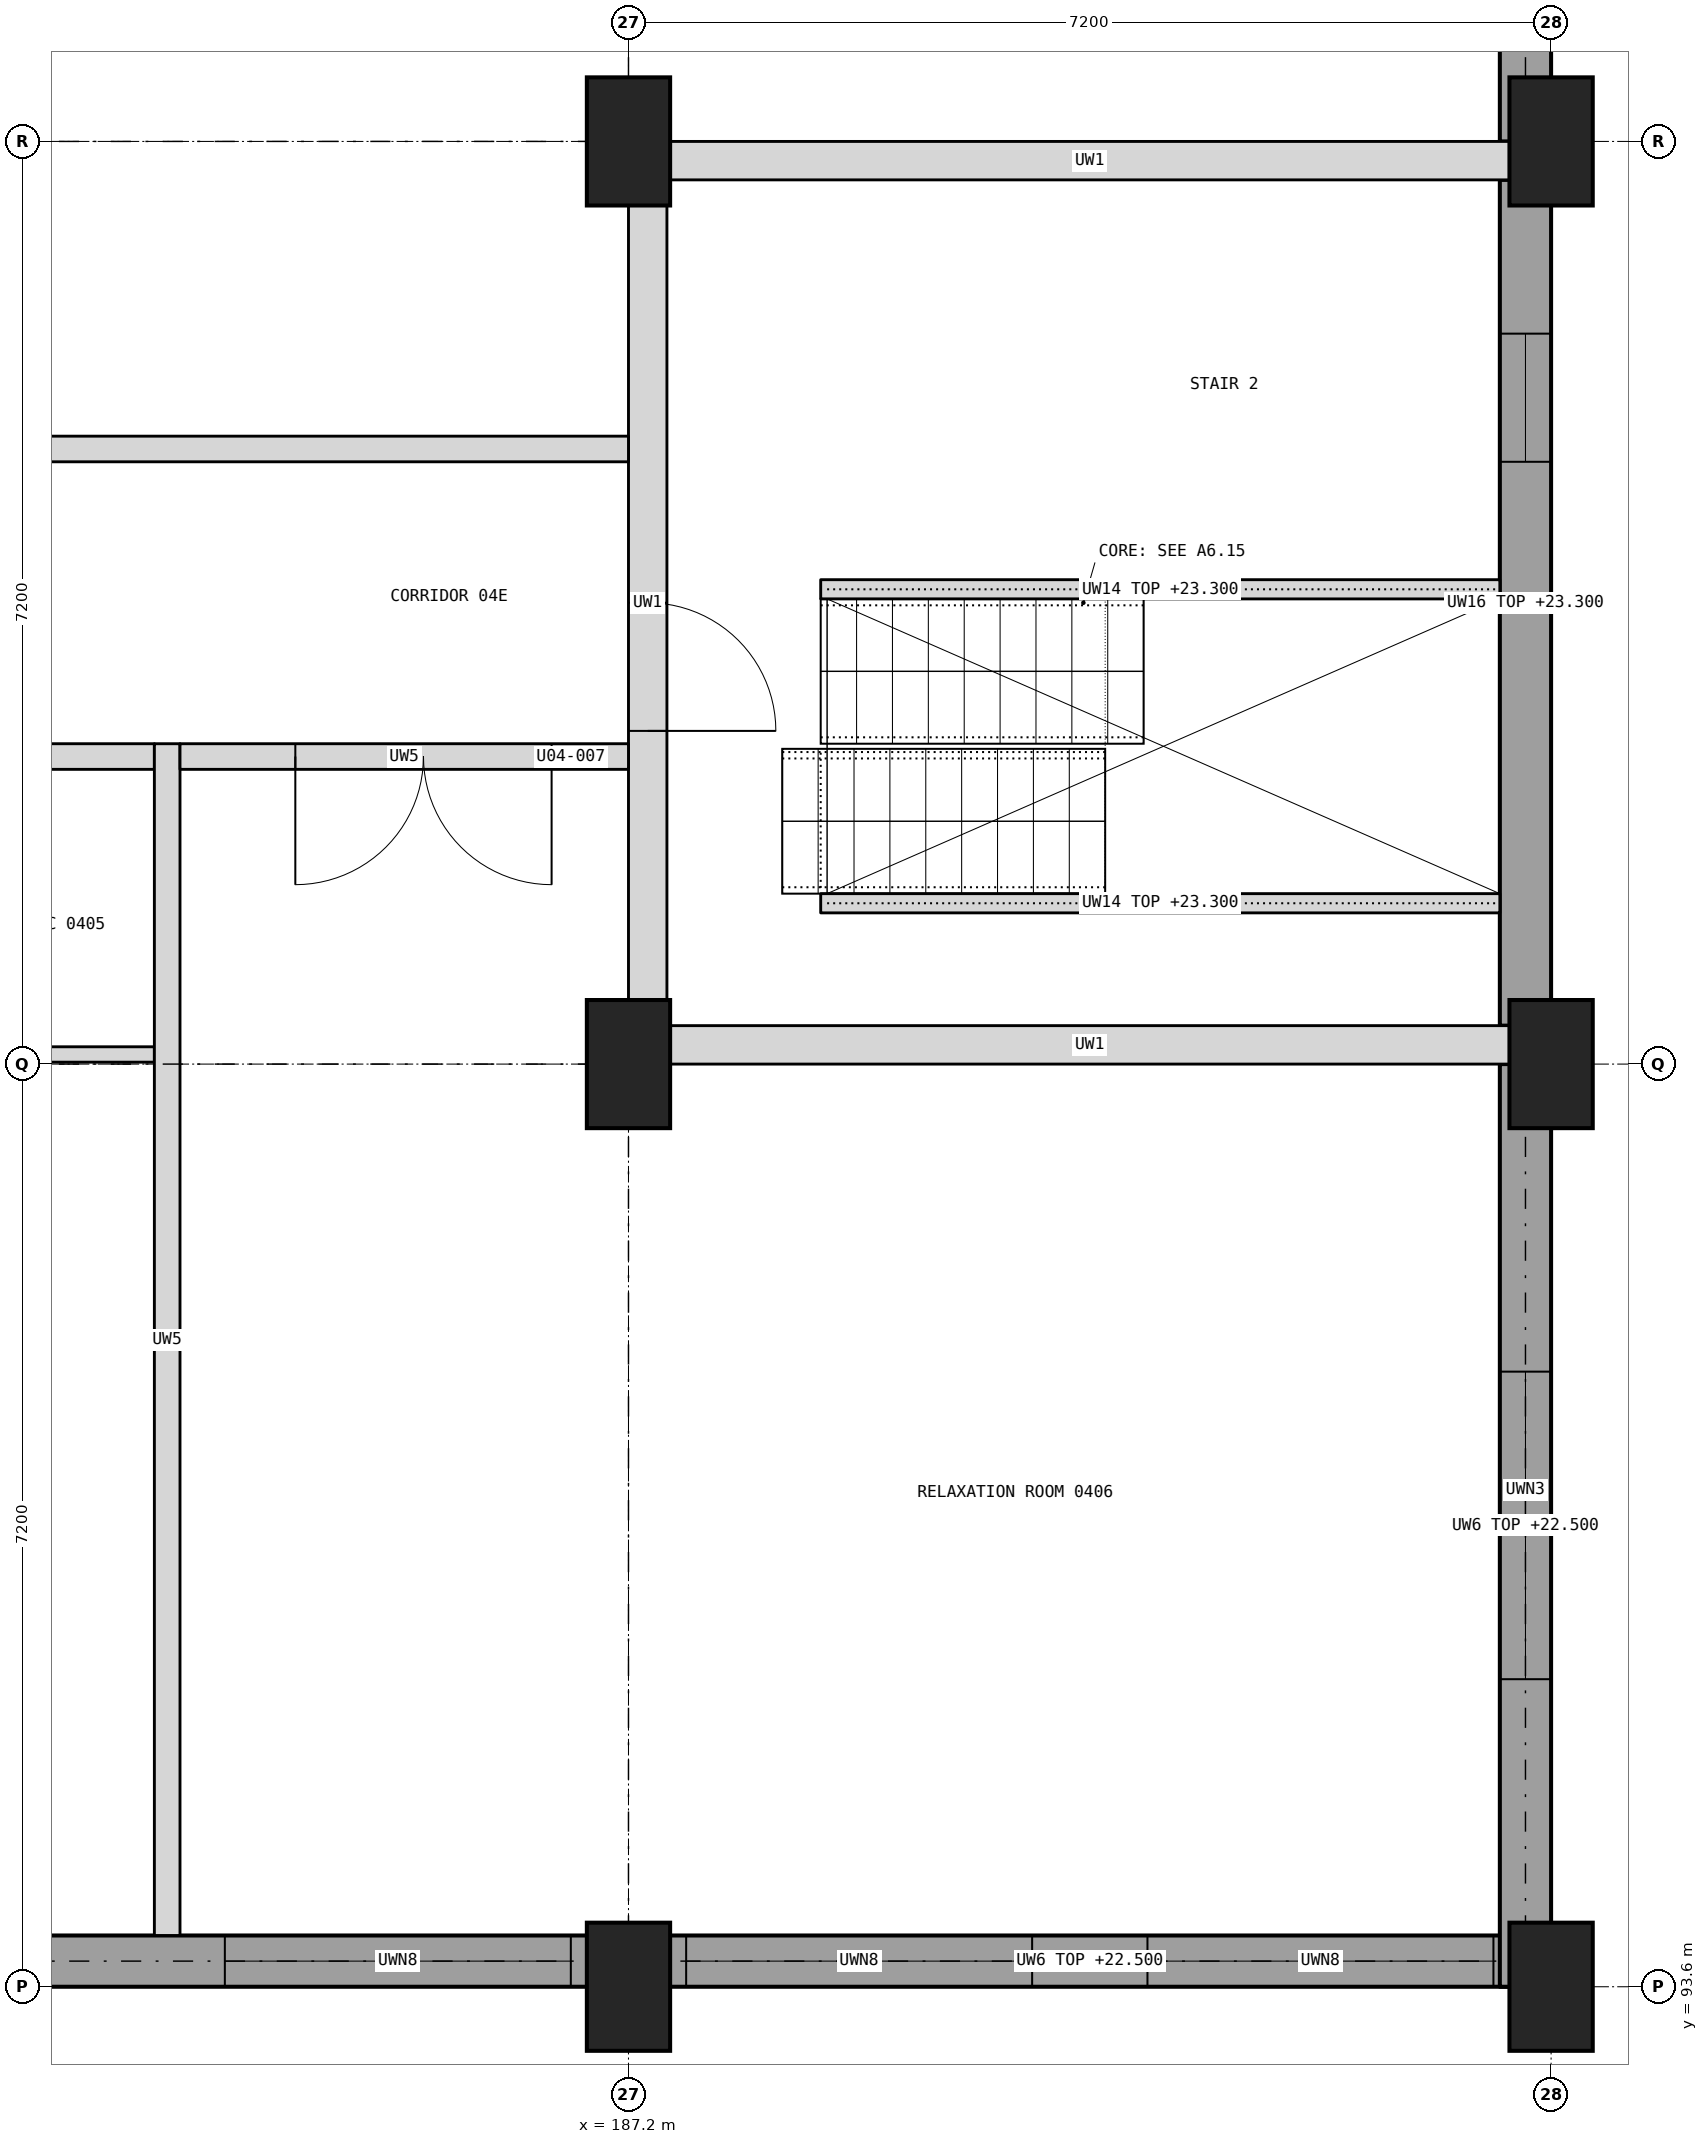
"""IFC4 building model, lengths in metres.
Left out: names, types, materials, properties, quantities, classifications, styles, units other than length and angle.
Written with IfcOpenShell. Run it as: python <this file> out.ifc"""

import sys

from ifc_helpers import new_model, si_unit, direction, frame, frame_2d, origin, origin_2d, place, context, subcontext, project, spatial, rectangle, extrude, element, fill, save


model = new_model("IFC4")
c1 = context("Model", 3, precision=1e-05, world=origin(), true_north=direction((0.0, 1.0)))
c2 = subcontext(c1, "Body", "Model", "MODEL_VIEW")
j1 = project(units=[si_unit("LENGTHUNIT", "METRE"), si_unit("PLANEANGLEUNIT", "RADIAN")], contexts=[c1])
p1 = place(None, origin())
s1 = spatial("IfcSite", under=j1, at=p1, CompositionType="ELEMENT")
p2 = place(p1, origin())
s2 = spatial("IfcBuilding", under=s1, at=p2, CompositionType="ELEMENT")
p3 = place(p2, frame((0.0, 0.0, 19.9)))
s3 = spatial("IfcBuildingStorey", under=s2, at=p3, CompositionType="ELEMENT", Elevation=19.9)
for number, where, z_axis, x_axis in (
    (1, (187.2, 93.6, 0.0), (0.0, 0.0, 1.0), (1.0, 0.0, 0.0)),
    (2, (187.2, 100.8, 0.0), (0.0, 0.0, 1.0), (1.0, 0.0, 0.0)),
    (3, (187.2, 108.0, 0.0), (0.0, 0.0, 1.0), (1.0, 0.0, 0.0)),
    (4, (194.4, 93.6, 0.0), (0.0, 0.0, 1.0), (1.0, 0.0, 0.0)),
    (5, (194.4, 100.8, 0.0), (0.0, 0.0, 1.0), (1.0, 0.0, 0.0)),
    (6, (194.4, 108.0, 0.0), (0.0, 0.0, 1.0), (1.0, 0.0, 0.0)),
):
    element("IfcColumn", number, at=place(p3, frame(where, z_axis=z_axis, x_axis=x_axis)), inside=s3, PredefinedType="COLUMN", context=c2, shape_type="SweptSolid", body=[
        extrude(rectangle(XDim=0.65, YDim=1.0, at=origin_2d()), origin(), (0.0, 0.0, 1.0), 3.4),
    ])
for number, where, z_axis, x_axis in (
    (7, (194.4, 100.95, 0.0), (0.0, 0.0, 1.0), (-1.0, 0.0, 0.0)),
    (8, (194.4, 107.85, 0.0), (0.0, 0.0, 1.0), (-1.0, 0.0, 0.0)),
):
    element("IfcWall", number, at=place(p3, frame(where, z_axis=z_axis, x_axis=x_axis)), inside=s3, PredefinedType="SHEAR", context=c2, shape_type="SweptSolid", body=[
        extrude(rectangle(XDim=7.2, YDim=0.3, at=frame_2d((3.6, 0.0))), origin(), (0.0, 0.0, 1.0), 3.4),
    ])
p4 = place(p3, frame((187.35, 101.1, 0.0), z_axis=(0.0, 0.0, 1.0), x_axis=(0.0, 1.0, 0.0)))
e9 = element("IfcWall", 9, at=p4, inside=s3, PredefinedType="SHEAR", context=c2, shape_type="SweptSolid", body=[
    extrude(rectangle(XDim=6.6, YDim=0.3, at=frame_2d((3.3, 0.0))), origin(), (0.0, 0.0, 1.0), 3.4),
])
p5 = place(p4, frame((2.3, 0.0, 0.0)))
e10 = element("IfcOpeningElement", 10, at=p5, cuts=e9, PredefinedType="OPENING", context=c2, shape_type="SweptSolid", body=[
    extrude(rectangle(XDim=1.0, YDim=2.1, at=frame_2d((0.5, 1.05))), frame((0.0, 0.16, 0.0), z_axis=(0.0, -1.0, 0.0), x_axis=(1.0, 0.0, 0.0)), (0.0, 0.0, 1.0), 0.32),
])
p6 = place(p3, frame((194.2, 101.1, 0.0), z_axis=(0.0, 0.0, 1.0), x_axis=(0.0, 1.0, 0.0)))
e11 = element("IfcWall", 11, at=p6, inside=s3, PredefinedType="SHEAR", context=c2, shape_type="SweptSolid", body=[
    extrude(rectangle(XDim=6.6, YDim=0.4, at=frame_2d((3.3, 0.0))), origin(), (0.0, 0.0, 1.0), 3.4),
])
p7 = place(p6, frame((4.4, 0.0, 1.0)))
e12 = element("IfcOpeningElement", 12, at=p7, cuts=e11, PredefinedType="OPENING", context=c2, shape_type="SweptSolid", body=[
    extrude(rectangle(XDim=1.0, YDim=1.5, at=frame_2d((0.5, 0.75))), frame((0.0, 0.21, 0.0), z_axis=(0.0, -1.0, 0.0), x_axis=(1.0, 0.0, 0.0)), (0.0, 0.0, 1.0), 0.42),
])
for number, where, z_axis, x_axis in (
    (13, (188.7, 102.055, 0.0), (0.0, 0.0, 1.0), (1.0, 0.0, 0.0)),
    (14, (188.7, 104.505, 0.0), (0.0, 0.0, 1.0), (1.0, 0.0, 0.0)),
):
    element("IfcWall", number, at=place(p3, frame(where, z_axis=z_axis, x_axis=x_axis)), inside=s3, PredefinedType="SHEAR", context=c2, shape_type="SweptSolid", body=[
        extrude(rectangle(XDim=5.3, YDim=0.15, at=frame_2d((2.65, 0.0))), origin(), (0.0, 0.0, 1.0), 3.4),
    ])
p8 = place(p3, frame((180.0, 93.8, 0.0), z_axis=(0.0, 0.0, 1.0), x_axis=(1.0, 0.0, 0.0)))
e15 = element("IfcWall", 15, at=p8, inside=s3, PredefinedType="SOLIDWALL", context=c2, shape_type="SweptSolid", body=[
    extrude(rectangle(XDim=7.2, YDim=0.4, at=frame_2d((3.6, 0.0))), origin(), (0.0, 0.0, 1.0), 2.6),
])
p9 = place(p8, frame((1.4, 0.0, 0.9)))
e16 = element("IfcOpeningElement", 16, at=p9, cuts=e15, PredefinedType="OPENING", context=c2, shape_type="SweptSolid", body=[
    extrude(rectangle(XDim=0.8, YDim=1.5, at=frame_2d((0.4, 0.75))), frame((0.0, 0.21, 0.0), z_axis=(0.0, -1.0, 0.0), x_axis=(1.0, 0.0, 0.0)), (0.0, 0.0, 1.0), 0.42),
])
p10 = place(p8, frame((4.05, 0.0, 0.9)))
e17 = element("IfcOpeningElement", 17, at=p10, cuts=e15, PredefinedType="OPENING", context=c2, shape_type="SweptSolid", body=[
    extrude(rectangle(XDim=2.7, YDim=1.5, at=frame_2d((1.35, 0.75))), frame((0.0, 0.21, 0.0), z_axis=(0.0, -1.0, 0.0), x_axis=(1.0, 0.0, 0.0)), (0.0, 0.0, 1.0), 0.42),
])
p11 = place(p3, frame((187.2, 93.8, 0.0), z_axis=(0.0, 0.0, 1.0), x_axis=(1.0, 0.0, 0.0)))
e18 = element("IfcWall", 18, at=p11, inside=s3, PredefinedType="SOLIDWALL", context=c2, shape_type="SweptSolid", body=[
    extrude(rectangle(XDim=7.2, YDim=0.4, at=frame_2d((3.6, 0.0))), origin(), (0.0, 0.0, 1.0), 2.6),
])
p12 = place(p11, frame((0.45, 0.0, 0.9)))
e19 = element("IfcOpeningElement", 19, at=p12, cuts=e18, PredefinedType="OPENING", context=c2, shape_type="SweptSolid", body=[
    extrude(rectangle(XDim=2.7, YDim=1.5, at=frame_2d((1.35, 0.75))), frame((0.0, 0.21, 0.0), z_axis=(0.0, -1.0, 0.0), x_axis=(1.0, 0.0, 0.0)), (0.0, 0.0, 1.0), 0.42),
])
p13 = place(p11, frame((4.05, 0.0, 0.9)))
e20 = element("IfcOpeningElement", 20, at=p13, cuts=e18, PredefinedType="OPENING", context=c2, shape_type="SweptSolid", body=[
    extrude(rectangle(XDim=2.7, YDim=1.5, at=frame_2d((1.35, 0.75))), frame((0.0, 0.21, 0.0), z_axis=(0.0, -1.0, 0.0), x_axis=(1.0, 0.0, 0.0)), (0.0, 0.0, 1.0), 0.42),
])
p14 = place(p3, frame((194.2, 93.6, 0.0), z_axis=(0.0, 0.0, 1.0), x_axis=(0.0, 1.0, 0.0)))
e21 = element("IfcWall", 21, at=p14, inside=s3, PredefinedType="SOLIDWALL", context=c2, shape_type="SweptSolid", body=[
    extrude(rectangle(XDim=7.2, YDim=0.4, at=frame_2d((3.6, 0.0))), origin(), (0.0, 0.0, 1.0), 2.6),
])
p15 = place(p14, frame((2.4, 0.0, 0.9)))
e22 = element("IfcOpeningElement", 22, at=p15, cuts=e21, PredefinedType="OPENING", context=c2, shape_type="SweptSolid", body=[
    extrude(rectangle(XDim=2.4, YDim=1.5, at=frame_2d((1.2, 0.75))), frame((0.0, 0.21, 0.0), z_axis=(0.0, -1.0, 0.0), x_axis=(1.0, 0.0, 0.0)), (0.0, 0.0, 1.0), 0.42),
])
p16 = place(p3, frame((194.2, 108.0, 0.0), z_axis=(0.0, 0.0, 1.0), x_axis=(0.0, 1.0, 0.0)))
e23 = element("IfcWall", 23, at=p16, inside=s3, PredefinedType="SOLIDWALL", context=c2, shape_type="SweptSolid", body=[
    extrude(rectangle(XDim=7.2, YDim=0.4, at=frame_2d((3.6, 0.0))), origin(), (0.0, 0.0, 1.0), 2.6),
])
p17 = place(p16, frame((2.4, 0.0, 0.9)))
e24 = element("IfcOpeningElement", 24, at=p17, cuts=e23, PredefinedType="OPENING", context=c2, shape_type="SweptSolid", body=[
    extrude(rectangle(XDim=2.4, YDim=1.5, at=frame_2d((1.2, 0.75))), frame((0.0, 0.21, 0.0), z_axis=(0.0, -1.0, 0.0), x_axis=(1.0, 0.0, 0.0)), (0.0, 0.0, 1.0), 0.42),
])
p18 = place(p3, frame((180.275, 100.875, 0.0), z_axis=(0.0, 0.0, 1.0), x_axis=(1.0, 0.0, 0.0)))
e25 = element("IfcWall", 25, at=p18, inside=s3, PredefinedType="PARTITIONING", context=c2, shape_type="SweptSolid", body=[
    extrude(rectangle(XDim=3.225, YDim=0.12, at=frame_2d((1.613, 0.0))), origin(), (0.0, 0.0, 1.0), 2.55),
])
p19 = place(p18, frame((1.15, 0.0, 0.0)))
e26 = element("IfcOpeningElement", 26, at=p19, cuts=e25, PredefinedType="OPENING", context=c2, shape_type="SweptSolid", body=[
    extrude(rectangle(XDim=0.75, YDim=2.1, at=frame_2d((0.375, 1.05))), frame((0.0, 0.07, 0.0), z_axis=(0.0, -1.0, 0.0), x_axis=(1.0, 0.0, 0.0)), (0.0, 0.0, 1.0), 0.14),
])
p20 = place(p3, frame((180.1, 103.2, 0.0), z_axis=(0.0, 0.0, 1.0), x_axis=(1.0, 0.0, 0.0)))
e27 = element("IfcWall", 27, at=p20, inside=s3, PredefinedType="PARTITIONING", context=c2, shape_type="SweptSolid", body=[
    extrude(rectangle(XDim=3.4, YDim=0.2, at=frame_2d((1.7, 0.0))), origin(), (0.0, 0.0, 1.0), 3.1),
])
p21 = place(p20, frame((1.25, 0.0, 0.0)))
e28 = element("IfcOpeningElement", 28, at=p21, cuts=e27, PredefinedType="OPENING", context=c2, shape_type="SweptSolid", body=[
    extrude(rectangle(XDim=0.9, YDim=2.1, at=frame_2d((0.45, 1.05))), frame((0.0, 0.11, 0.0), z_axis=(0.0, -1.0, 0.0), x_axis=(1.0, 0.0, 0.0)), (0.0, 0.0, 1.0), 0.22),
])
p22 = place(p3, frame((183.6, 94.0, 0.0), z_axis=(0.0, 0.0, 1.0), x_axis=(0.0, 1.0, 0.0)))
e29 = element("IfcWall", 29, at=p22, inside=s3, PredefinedType="PARTITIONING", context=c2, shape_type="SweptSolid", body=[
    extrude(rectangle(XDim=9.3, YDim=0.2, at=frame_2d((4.65, 0.0))), origin(), (0.0, 0.0, 1.0), 3.1),
])
p23 = place(p3, frame((183.7, 103.2, 0.0), z_axis=(0.0, 0.0, 1.0), x_axis=(1.0, 0.0, 0.0)))
e30 = element("IfcWall", 30, at=p23, inside=s3, PredefinedType="PARTITIONING", context=c2, shape_type="SweptSolid", body=[
    extrude(rectangle(XDim=3.5, YDim=0.2, at=frame_2d((1.75, 0.0))), origin(), (0.0, 0.0, 1.0), 3.1),
])
p24 = place(p23, frame((0.9, 0.0, 0.0)))
e31 = element("IfcOpeningElement", 31, at=p24, cuts=e30, PredefinedType="OPENING", context=c2, shape_type="SweptSolid", body=[
    extrude(rectangle(XDim=2.0, YDim=2.1, at=frame_2d((1.0, 1.05))), frame((0.0, 0.11, 0.0), z_axis=(0.0, -1.0, 0.0), x_axis=(1.0, 0.0, 0.0)), (0.0, 0.0, 1.0), 0.22),
])
p25 = place(p3, frame((176.5, 105.6, 0.0), z_axis=(0.0, 0.0, 1.0), x_axis=(1.0, 0.0, 0.0)))
e32 = element("IfcWall", 32, at=p25, inside=s3, PredefinedType="PARTITIONING", context=c2, shape_type="SweptSolid", body=[
    extrude(rectangle(XDim=10.7, YDim=0.2, at=frame_2d((5.35, 0.0))), origin(), (0.0, 0.0, 1.0), 3.1),
])
p26 = place(p25, frame((0.9, 0.0, 0.0)))
e33 = element("IfcOpeningElement", 33, at=p26, cuts=e32, PredefinedType="OPENING", context=c2, shape_type="SweptSolid", body=[
    extrude(rectangle(XDim=2.0, YDim=2.1, at=frame_2d((1.0, 1.05))), frame((0.0, 0.11, 0.0), z_axis=(0.0, -1.0, 0.0), x_axis=(1.0, 0.0, 0.0)), (0.0, 0.0, 1.0), 0.22),
])
p27 = place(p10, origin())
e34 = element("IfcWindow", 34, at=p27, inside=s3, PartitioningType="TRIPLE_PANEL_VERTICAL", PredefinedType="WINDOW", context=c2, shape_type="SweptSolid", body=[
    extrude(rectangle(XDim=2.7, YDim=1.5, at=frame_2d((1.35, 0.75))), frame((0.0, 0.03, 0.0), z_axis=(0.0, -1.0, 0.0), x_axis=(1.0, 0.0, 0.0)), (0.0, 0.0, 1.0), 0.06),
])
fill(e17, e34)
p28 = place(p12, origin())
e35 = element("IfcWindow", 35, at=p28, inside=s3, PartitioningType="TRIPLE_PANEL_VERTICAL", PredefinedType="WINDOW", context=c2, shape_type="SweptSolid", body=[
    extrude(rectangle(XDim=2.7, YDim=1.5, at=frame_2d((1.35, 0.75))), frame((0.0, 0.03, 0.0), z_axis=(0.0, -1.0, 0.0), x_axis=(1.0, 0.0, 0.0)), (0.0, 0.0, 1.0), 0.06),
])
fill(e19, e35)
p29 = place(p13, origin())
e36 = element("IfcWindow", 36, at=p29, inside=s3, PartitioningType="TRIPLE_PANEL_VERTICAL", PredefinedType="WINDOW", context=c2, shape_type="SweptSolid", body=[
    extrude(rectangle(XDim=2.7, YDim=1.5, at=frame_2d((1.35, 0.75))), frame((0.0, 0.03, 0.0), z_axis=(0.0, -1.0, 0.0), x_axis=(1.0, 0.0, 0.0)), (0.0, 0.0, 1.0), 0.06),
])
fill(e20, e36)
p30 = place(p15, origin())
e37 = element("IfcWindow", 37, at=p30, inside=s3, PartitioningType="DOUBLE_PANEL_VERTICAL", PredefinedType="WINDOW", context=c2, shape_type="SweptSolid", body=[
    extrude(rectangle(XDim=2.4, YDim=1.5, at=frame_2d((1.2, 0.75))), frame((0.0, 0.03, 0.0), z_axis=(0.0, -1.0, 0.0), x_axis=(1.0, 0.0, 0.0)), (0.0, 0.0, 1.0), 0.06),
])
fill(e22, e37)
p31 = place(p7, origin())
e38 = element("IfcWindow", 38, at=p31, inside=s3, PartitioningType="SINGLE_PANEL", PredefinedType="WINDOW", context=c2, shape_type="SweptSolid", body=[
    extrude(rectangle(XDim=1.0, YDim=1.5, at=frame_2d((0.5, 0.75))), frame((0.0, 0.03, 0.0), z_axis=(0.0, -1.0, 0.0), x_axis=(1.0, 0.0, 0.0)), (0.0, 0.0, 1.0), 0.06),
])
fill(e12, e38)
p32 = place(p24, frame((2.0, 0.0, 0.0), z_axis=(0.0, 0.0, 1.0), x_axis=(-1.0, 0.0, 0.0)))
e39 = element("IfcDoor", 39, at=p32, inside=s3, OperationType="DOUBLE_DOOR_SINGLE_SWING", PredefinedType="DOOR", context=c2, shape_type="SweptSolid", body=[
    extrude(rectangle(XDim=2.0, YDim=2.1, at=frame_2d((1.0, 1.05))), frame((0.0, 0.025, 0.0), z_axis=(0.0, -1.0, 0.0), x_axis=(1.0, 0.0, 0.0)), (0.0, 0.0, 1.0), 0.05),
])
fill(e31, e39)
p33 = place(p5, frame((1.0, 0.0, 0.0), z_axis=(0.0, 0.0, 1.0), x_axis=(-1.0, 0.0, 0.0)))
e40 = element("IfcDoor", 40, at=p33, inside=s3, OperationType="SINGLE_SWING_RIGHT", PredefinedType="DOOR", context=c2, shape_type="SweptSolid", body=[
    extrude(rectangle(XDim=1.0, YDim=2.1, at=frame_2d((0.5, 1.05))), frame((0.0, 0.025, 0.0), z_axis=(0.0, -1.0, 0.0), x_axis=(1.0, 0.0, 0.0)), (0.0, 0.0, 1.0), 0.05),
])
fill(e10, e40)
save(model, sys.argv[1])
